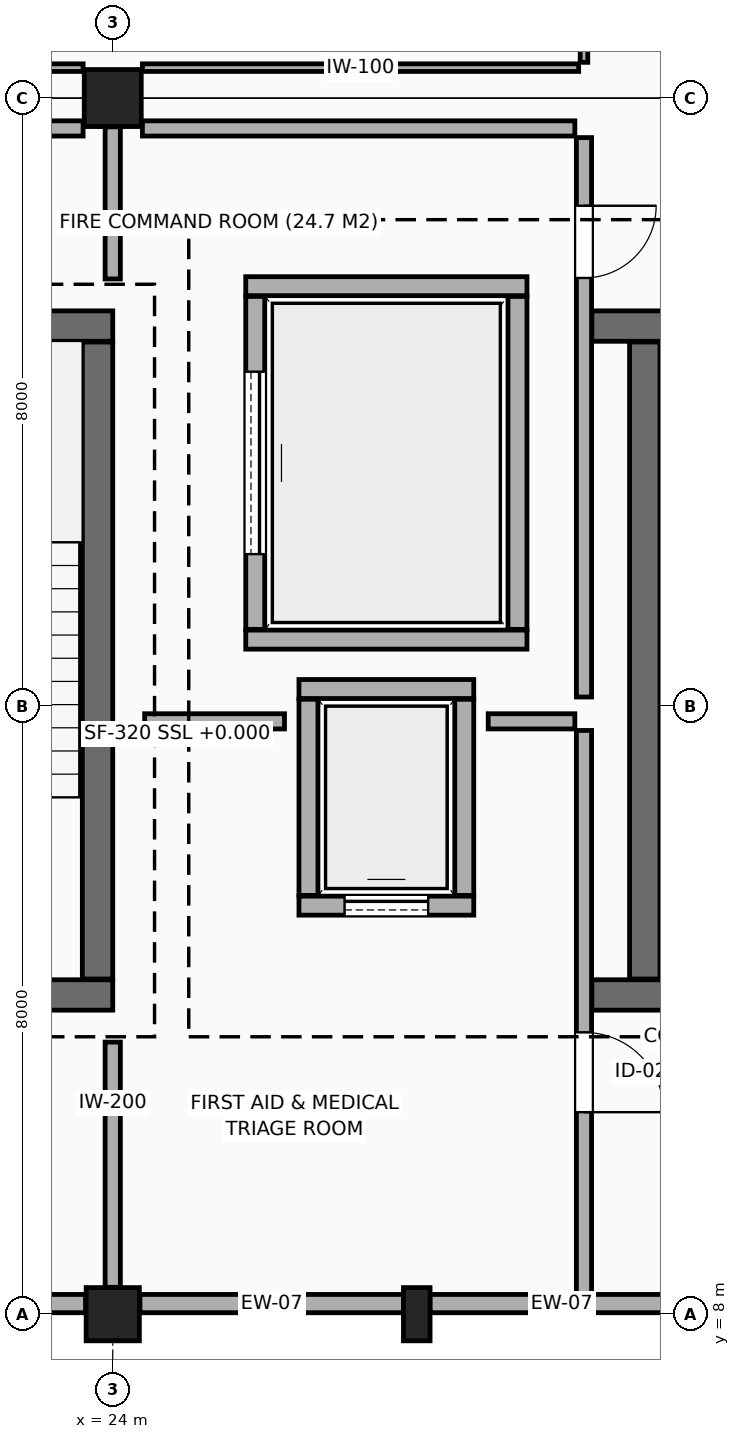
"""IFC4 building model, lengths in metres.
Left out: names, types, materials, properties, quantities, classifications, styles, units other than length and angle.
Written with IfcOpenShell. Run it as: python <this file> out.ifc"""

import sys

from ifc_helpers import new_model, si_unit, direction, frame, frame_2d, origin, origin_2d, place, context, subcontext, project, spatial, rectangle, circle, extrude, element, fill, save


model = new_model("IFC4")
c1 = context("Model", 3, precision=1e-05, world=origin(), true_north=direction((0.0, 1.0)))
c2 = subcontext(c1, "Body", "Model", "MODEL_VIEW")
j1 = project(units=[si_unit("LENGTHUNIT", "METRE"), si_unit("PLANEANGLEUNIT", "RADIAN")], contexts=[c1])
p1 = place(None, origin())
s1 = spatial("IfcSite", under=j1, at=p1, CompositionType="ELEMENT")
p2 = place(p1, origin())
s2 = spatial("IfcBuilding", under=s1, at=p2, CompositionType="ELEMENT")
p3 = place(p2, origin())
s3 = spatial("IfcBuildingStorey", under=s2, at=p3, CompositionType="ELEMENT", Elevation=0.0)
p4 = place(p3, frame((24.0, 8.0, 0.0), z_axis=(0.0, 0.0, 1.0), x_axis=(1.0, 0.0, 0.0)))
e1 = element("IfcColumn", 1, at=p4, inside=s3, PredefinedType="COLUMN", context=c2, shape_type="SweptSolid", body=[
    extrude(circle(Radius=0.35, at=origin_2d()), origin(), (0.0, 0.0, 1.0), 5.4),
])
p5 = place(p3, frame((24.0, 24.0, 0.0), z_axis=(0.0, 0.0, 1.0), x_axis=(1.0, 0.0, 0.0)))
e2 = element("IfcColumn", 2, at=p5, inside=s3, PredefinedType="COLUMN", context=c2, shape_type="SweptSolid", body=[
    extrude(rectangle(XDim=0.75, YDim=0.75, at=origin_2d()), origin(), (0.0, 0.0, 1.0), 5.4),
])
p6 = place(p3, frame((28.0, 8.0, 0.0), z_axis=(0.0, 0.0, 1.0), x_axis=(1.0, 0.0, 0.0)))
e3 = element("IfcColumn", 3, at=p6, inside=s3, PredefinedType="PILASTER", context=c2, shape_type="SweptSolid", body=[
    extrude(rectangle(XDim=0.35, YDim=0.7, at=origin_2d()), origin(), (0.0, 0.0, 1.0), 5.4),
])
for number, where, z_axis, x_axis in (
    (4, (31.642, 8.14, 0.0), (0.0, 0.0, 1.0), (-1.0, 0.0, 0.0)),
    (5, (27.828, 8.14, 0.0), (0.0, 0.0, 1.0), (-1.0, 0.0, 0.0)),
):
    element("IfcWall", number, at=place(p3, frame(where, z_axis=z_axis, x_axis=x_axis)), inside=s3, PredefinedType="ELEMENTEDWALL", context=c2, shape_type="SweptSolid", body=[
        extrude(rectangle(XDim=3.47, YDim=0.24, at=frame_2d((1.735, 0.0))), origin(), (0.0, 0.0, 1.0), 4.555),
    ])
p7 = place(p3, frame((23.642, 8.14, 0.0), z_axis=(0.0, 0.0, 1.0), x_axis=(-1.0, 0.0, 0.0)))
e6 = element("IfcWall", 6, at=p7, inside=s3, PredefinedType="ELEMENTEDWALL", context=c2, shape_type="SweptSolid", body=[
    extrude(rectangle(XDim=3.47, YDim=0.24, at=frame_2d((1.735, 0.0))), origin(), (0.0, 0.0, 1.0), 4.505),
])
p8 = place(p3, frame((30.304, 12.2, 0.0), z_axis=(0.0, 0.0, 1.0), x_axis=(1.0, 0.0, 0.0)))
e7 = element("IfcWall", 7, at=p8, inside=s3, PredefinedType="SHEAR", context=c2, shape_type="SweptSolid", body=[
    extrude(rectangle(XDim=8.896, YDim=0.4, at=frame_2d((4.448, 0.0))), origin(), (0.0, 0.0, 1.0), 5.12),
])
p9 = place(p8, frame((4.046, 0.0, 0.0)))
e8 = element("IfcOpeningElement", 8, at=p9, cuts=e7, PredefinedType="OPENING", context=c2, shape_type="SweptSolid", body=[
    extrude(rectangle(XDim=1.3, YDim=2.15, at=frame_2d((0.65, 1.075))), frame((0.0, 0.21, 0.0), z_axis=(0.0, -1.0, 0.0), x_axis=(1.0, 0.0, 0.0)), (0.0, 0.0, 1.0), 0.42),
])
p10 = place(p3, frame((39.2, 21.0, 0.0), z_axis=(0.0, 0.0, 1.0), x_axis=(-1.0, 0.0, 0.0)))
e9 = element("IfcWall", 9, at=p10, inside=s3, PredefinedType="SHEAR", context=c2, shape_type="SweptSolid", body=[
    extrude(rectangle(XDim=8.896, YDim=0.4, at=frame_2d((4.448, 0.0))), origin(), (0.0, 0.0, 1.0), 5.12),
])
p11 = place(p3, frame((31.0, 20.79, 0.0), z_axis=(0.0, 0.0, 1.0), x_axis=(0.0, -1.0, 0.0)))
e10 = element("IfcWall", 10, at=p11, inside=s3, PredefinedType="SHEAR", context=c2, shape_type="SweptSolid", body=[
    extrude(rectangle(XDim=8.38, YDim=0.4, at=frame_2d((4.19, 0.0))), origin(), (0.0, 0.0, 1.0), 5.12),
])
p12 = place(p3, frame((26.45, 13.375, 0.0), z_axis=(0.0, 0.0, 1.0), x_axis=(1.0, 0.0, 0.0)))
e11 = element("IfcWall", 11, at=p12, inside=s3, PredefinedType="STANDARD", context=c2, shape_type="SweptSolid", body=[
    extrude(rectangle(XDim=2.3, YDim=0.25, at=frame_2d((1.15, 0.0))), origin(), (0.0, 0.0, 1.0), 5.11),
])
p13 = place(p12, frame((0.6, 0.0, 0.0)))
e12 = element("IfcOpeningElement", 12, at=p13, cuts=e11, PredefinedType="OPENING", context=c2, shape_type="SweptSolid", body=[
    extrude(rectangle(XDim=1.1, YDim=2.15, at=frame_2d((0.55, 1.075))), frame((0.0, 0.135, 0.0), z_axis=(0.0, -1.0, 0.0), x_axis=(1.0, 0.0, 0.0)), (0.0, 0.0, 1.0), 0.27),
])
p14 = place(p3, frame((28.75, 16.225, 0.0), z_axis=(0.0, 0.0, 1.0), x_axis=(-1.0, 0.0, 0.0)))
e13 = element("IfcWall", 13, at=p14, inside=s3, PredefinedType="STANDARD", context=c2, shape_type="SweptSolid", body=[
    extrude(rectangle(XDim=2.3, YDim=0.25, at=frame_2d((1.15, 0.0))), origin(), (0.0, 0.0, 1.0), 5.11),
])
for number, where, z_axis, x_axis in (
    (14, (28.625, 13.51, 0.0), (0.0, 0.0, 1.0), (0.0, 1.0, 0.0)),
    (15, (26.575, 16.09, 0.0), (0.0, 0.0, 1.0), (0.0, -1.0, 0.0)),
):
    element("IfcWall", number, at=place(p3, frame(where, z_axis=z_axis, x_axis=x_axis)), inside=s3, PredefinedType="STANDARD", context=c2, shape_type="SweptSolid", body=[
        extrude(rectangle(XDim=2.58, YDim=0.25, at=frame_2d((1.29, 0.0))), origin(), (0.0, 0.0, 1.0), 5.11),
    ])
for number, where, z_axis, x_axis in (
    (16, (25.75, 16.875, 0.0), (0.0, 0.0, 1.0), (1.0, 0.0, 0.0)),
    (17, (29.45, 21.525, 0.0), (0.0, 0.0, 1.0), (-1.0, 0.0, 0.0)),
):
    element("IfcWall", number, at=place(p3, frame(where, z_axis=z_axis, x_axis=x_axis)), inside=s3, PredefinedType="STANDARD", context=c2, shape_type="SweptSolid", body=[
        extrude(rectangle(XDim=3.7, YDim=0.25, at=frame_2d((1.85, 0.0))), origin(), (0.0, 0.0, 1.0), 5.11),
    ])
p15 = place(p3, frame((29.325, 17.01, 0.0), z_axis=(0.0, 0.0, 1.0), x_axis=(0.0, 1.0, 0.0)))
e18 = element("IfcWall", 18, at=p15, inside=s3, PredefinedType="STANDARD", context=c2, shape_type="SweptSolid", body=[
    extrude(rectangle(XDim=4.38, YDim=0.25, at=frame_2d((2.19, 0.0))), origin(), (0.0, 0.0, 1.0), 5.11),
])
p16 = place(p3, frame((25.875, 21.39, 0.0), z_axis=(0.0, 0.0, 1.0), x_axis=(0.0, -1.0, 0.0)))
e19 = element("IfcWall", 19, at=p16, inside=s3, PredefinedType="STANDARD", context=c2, shape_type="SweptSolid", body=[
    extrude(rectangle(XDim=4.38, YDim=0.25, at=frame_2d((2.19, 0.0))), origin(), (0.0, 0.0, 1.0), 5.11),
])
p17 = place(p16, frame((0.99, 0.0, 0.0)))
e20 = element("IfcOpeningElement", 20, at=p17, cuts=e19, PredefinedType="OPENING", context=c2, shape_type="SweptSolid", body=[
    extrude(rectangle(XDim=2.4, YDim=2.55, at=frame_2d((1.2, 1.275))), frame((0.0, 0.135, 0.0), z_axis=(0.0, -1.0, 0.0), x_axis=(1.0, 0.0, 0.0)), (0.0, 0.0, 1.0), 0.27),
])
p18 = place(p3, frame((15.95, 12.2, 0.0), z_axis=(0.0, 0.0, 1.0), x_axis=(1.0, 0.0, 0.0)))
e21 = element("IfcWall", 21, at=p18, inside=s3, PredefinedType="SHEAR", context=c2, shape_type="SweptSolid", body=[
    extrude(rectangle(XDim=8.05, YDim=0.4, at=frame_2d((4.025, 0.0))), origin(), (0.0, 0.0, 1.0), 5.12),
])
p19 = place(p18, frame((3.375, 0.0, 0.0)))
e22 = element("IfcOpeningElement", 22, at=p19, cuts=e21, PredefinedType="OPENING", context=c2, shape_type="SweptSolid", body=[
    extrude(rectangle(XDim=1.3, YDim=2.15, at=frame_2d((0.65, 1.075))), frame((0.0, 0.21, 0.0), z_axis=(0.0, -1.0, 0.0), x_axis=(1.0, 0.0, 0.0)), (0.0, 0.0, 1.0), 0.42),
])
p20 = place(p3, frame((24.0, 21.0, 0.0), z_axis=(0.0, 0.0, 1.0), x_axis=(-1.0, 0.0, 0.0)))
e23 = element("IfcWall", 23, at=p20, inside=s3, PredefinedType="SHEAR", context=c2, shape_type="SweptSolid", body=[
    extrude(rectangle(XDim=8.05, YDim=0.4, at=frame_2d((4.025, 0.0))), origin(), (0.0, 0.0, 1.0), 5.12),
])
p21 = place(p3, frame((23.8, 12.41, 0.0), z_axis=(0.0, 0.0, 1.0), x_axis=(0.0, 1.0, 0.0)))
e24 = element("IfcWall", 24, at=p21, inside=s3, PredefinedType="SHEAR", context=c2, shape_type="SweptSolid", body=[
    extrude(rectangle(XDim=8.38, YDim=0.4, at=frame_2d((4.19, 0.0))), origin(), (0.0, 0.0, 1.0), 5.12),
])
p22 = place(p3, frame((24.0, 11.58, 0.0), z_axis=(0.0, 0.0, 1.0), x_axis=(0.0, -1.0, 0.0)))
e25 = element("IfcWall", 25, at=p22, inside=s3, PredefinedType="PARTITIONING", context=c2, shape_type="SweptSolid", body=[
    extrude(rectangle(XDim=3.226, YDim=0.2, at=frame_2d((1.613, 0.0))), origin(), (0.0, 0.0, 1.0), 5.11),
])
p23 = place(p3, frame((16.465, 23.6, 0.0), z_axis=(0.0, 0.0, 1.0), x_axis=(1.0, 0.0, 0.0)))
e26 = element("IfcWall", 26, at=p23, inside=s3, PredefinedType="PARTITIONING", context=c2, shape_type="SweptSolid", body=[
    extrude(rectangle(XDim=7.145, YDim=0.2, at=frame_2d((3.573, 0.0))), origin(), (0.0, 0.0, 1.0), 5.11),
])
p24 = place(p23, frame((3.962, 0.0, 0.0)))
e27 = element("IfcOpeningElement", 27, at=p24, cuts=e26, PredefinedType="OPENING", context=c2, shape_type="SweptSolid", body=[
    extrude(rectangle(XDim=1.05, YDim=2.15, at=frame_2d((0.525, 1.075))), frame((0.0, 0.11, 0.0), z_axis=(0.0, -1.0, 0.0), x_axis=(1.0, 0.0, 0.0)), (0.0, 0.0, 1.0), 0.22),
])
p25 = place(p3, frame((24.0, 23.621, 0.0), z_axis=(0.0, 0.0, 1.0), x_axis=(0.0, -1.0, 0.0)))
e28 = element("IfcWall", 28, at=p25, inside=s3, PredefinedType="PARTITIONING", context=c2, shape_type="SweptSolid", body=[
    extrude(rectangle(XDim=2.001, YDim=0.2, at=frame_2d((1.0, 0.0))), origin(), (0.0, 0.0, 1.0), 5.11),
])
p26 = place(p3, frame((24.42, 15.8, 0.0), z_axis=(0.0, 0.0, 1.0), x_axis=(1.0, 0.0, 0.0)))
e29 = element("IfcWall", 29, at=p26, inside=s3, PredefinedType="PARTITIONING", context=c2, shape_type="SweptSolid", body=[
    extrude(rectangle(XDim=1.84, YDim=0.2, at=frame_2d((0.92, 0.0))), origin(), (0.0, 0.0, 1.0), 5.11),
])
p27 = place(p3, frame((28.94, 15.8, 0.0), z_axis=(0.0, 0.0, 1.0), x_axis=(1.0, 0.0, 0.0)))
e30 = element("IfcWall", 30, at=p27, inside=s3, PredefinedType="PARTITIONING", context=c2, shape_type="SweptSolid", body=[
    extrude(rectangle(XDim=1.14, YDim=0.2, at=frame_2d((0.57, 0.0))), origin(), (0.0, 0.0, 1.0), 5.11),
])
p28 = place(p3, frame((30.2, 15.68, 0.0), z_axis=(0.0, 0.0, 1.0), x_axis=(0.0, -1.0, 0.0)))
e31 = element("IfcWall", 31, at=p28, inside=s3, PredefinedType="PARTITIONING", context=c2, shape_type="SweptSolid", body=[
    extrude(rectangle(XDim=7.416, YDim=0.2, at=frame_2d((3.708, 0.0))), origin(), (0.0, 0.0, 1.0), 5.11),
])
p29 = place(p28, frame((3.972, 0.0, 0.0)))
e32 = element("IfcOpeningElement", 32, at=p29, cuts=e31, PredefinedType="OPENING", context=c2, shape_type="SweptSolid", body=[
    extrude(rectangle(XDim=1.05, YDim=2.15, at=frame_2d((0.525, 1.075))), frame((0.0, 0.11, 0.0), z_axis=(0.0, -1.0, 0.0), x_axis=(1.0, 0.0, 0.0)), (0.0, 0.0, 1.0), 0.22),
])
p30 = place(p3, frame((24.39, 23.6, 0.0), z_axis=(0.0, 0.0, 1.0), x_axis=(1.0, 0.0, 0.0)))
e33 = element("IfcWall", 33, at=p30, inside=s3, PredefinedType="PARTITIONING", context=c2, shape_type="SweptSolid", body=[
    extrude(rectangle(XDim=5.69, YDim=0.2, at=frame_2d((2.845, 0.0))), origin(), (0.0, 0.0, 1.0), 5.11),
])
p31 = place(p3, frame((30.2, 23.48, 0.0), z_axis=(0.0, 0.0, 1.0), x_axis=(0.0, -1.0, 0.0)))
e34 = element("IfcWall", 34, at=p31, inside=s3, PredefinedType="PARTITIONING", context=c2, shape_type="SweptSolid", body=[
    extrude(rectangle(XDim=7.36, YDim=0.2, at=frame_2d((3.68, 0.0))), origin(), (0.0, 0.0, 1.0), 5.11),
])
p32 = place(p31, frame((0.897, 0.0, 0.0)))
e35 = element("IfcOpeningElement", 35, at=p32, cuts=e34, PredefinedType="OPENING", context=c2, shape_type="SweptSolid", body=[
    extrude(rectangle(XDim=0.95, YDim=2.15, at=frame_2d((0.475, 1.075))), frame((0.0, 0.11, 0.0), z_axis=(0.0, -1.0, 0.0), x_axis=(1.0, 0.0, 0.0)), (0.0, 0.0, 1.0), 0.22),
])
p33 = place(p3, frame((30.13, 24.4, 0.0), z_axis=(0.0, 0.0, 1.0), x_axis=(-1.0, 0.0, 0.0)))
e36 = element("IfcWall", 36, at=p33, inside=s3, PredefinedType="PARTITIONING", context=c2, shape_type="SweptSolid", body=[
    extrude(rectangle(XDim=5.74, YDim=0.1, at=frame_2d((2.87, 0.0))), origin(), (0.0, 0.0, 1.0), 5.11),
])
p34 = place(p3, frame((23.61, 24.4, 0.0), z_axis=(0.0, 0.0, 1.0), x_axis=(-1.0, 0.0, 0.0)))
e37 = element("IfcWall", 37, at=p34, inside=s3, PredefinedType="PARTITIONING", context=c2, shape_type="SweptSolid", body=[
    extrude(rectangle(XDim=7.145, YDim=0.1, at=frame_2d((3.573, 0.0))), origin(), (0.0, 0.0, 1.0), 5.11),
])
p35 = place(p3, frame((30.2, 31.93, 0.0), z_axis=(0.0, 0.0, 1.0), x_axis=(0.0, -1.0, 0.0)))
e38 = element("IfcWall", 38, at=p35, inside=s3, PredefinedType="PARTITIONING", context=c2, shape_type="SweptSolid", body=[
    extrude(rectangle(XDim=7.46, YDim=0.1, at=frame_2d((3.73, 0.0))), origin(), (0.0, 0.0, 1.0), 5.11),
])
p36 = place(p35, frame((3.255, 0.0, 0.0)))
e39 = element("IfcOpeningElement", 39, at=p36, cuts=e38, PredefinedType="OPENING", context=c2, shape_type="SweptSolid", body=[
    extrude(rectangle(XDim=0.95, YDim=2.15, at=frame_2d((0.475, 1.075))), frame((0.0, 0.06, 0.0), z_axis=(0.0, -1.0, 0.0), x_axis=(1.0, 0.0, 0.0)), (0.0, 0.0, 1.0), 0.12),
])
p37 = place(p13, origin())
e40 = element("IfcDoor", 40, at=p37, inside=s3, OperationType="DOUBLE_DOOR_SLIDING", PredefinedType="DOOR", context=c2, shape_type="SweptSolid", body=[
    extrude(rectangle(XDim=1.1, YDim=2.15, at=frame_2d((0.55, 1.075))), frame((0.0, 0.025, 0.0), z_axis=(0.0, -1.0, 0.0), x_axis=(1.0, 0.0, 0.0)), (0.0, 0.0, 1.0), 0.05),
])
fill(e12, e40)
p38 = place(p17, origin())
e41 = element("IfcDoor", 41, at=p38, inside=s3, OperationType="DOUBLE_DOOR_SLIDING", PredefinedType="DOOR", context=c2, shape_type="SweptSolid", body=[
    extrude(rectangle(XDim=2.4, YDim=2.55, at=frame_2d((1.2, 1.275))), frame((0.0, 0.025, 0.0), z_axis=(0.0, -1.0, 0.0), x_axis=(1.0, 0.0, 0.0)), (0.0, 0.0, 1.0), 0.05),
])
fill(e20, e41)
p39 = place(p29, origin())
e42 = element("IfcDoor", 42, at=p39, inside=s3, OperationType="SINGLE_SWING_RIGHT", PredefinedType="DOOR", context=c2, shape_type="SweptSolid", body=[
    extrude(rectangle(XDim=1.05, YDim=2.15, at=frame_2d((0.525, 1.075))), frame((0.0, 0.025, 0.0), z_axis=(0.0, -1.0, 0.0), x_axis=(1.0, 0.0, 0.0)), (0.0, 0.0, 1.0), 0.05),
])
fill(e32, e42)
p40 = place(p32, origin())
e43 = element("IfcDoor", 43, at=p40, inside=s3, OperationType="SINGLE_SWING_LEFT", PredefinedType="DOOR", context=c2, shape_type="SweptSolid", body=[
    extrude(rectangle(XDim=0.95, YDim=2.15, at=frame_2d((0.475, 1.075))), frame((0.0, 0.025, 0.0), z_axis=(0.0, -1.0, 0.0), x_axis=(1.0, 0.0, 0.0)), (0.0, 0.0, 1.0), 0.05),
])
fill(e35, e43)
save(model, sys.argv[1])
